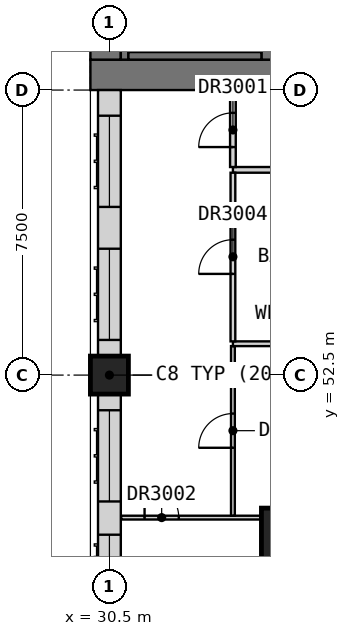
"""IFC4 building model, lengths in metres.
Left out: names, types, materials, properties, quantities, classifications, styles, units other than length and angle.
Written with IfcOpenShell. Run it as: python <this file> out.ifc"""

import sys

from ifc_helpers import new_model, si_unit, direction, frame, frame_2d, origin, origin_2d, place, context, subcontext, project, spatial, rectangle, extrude, element, fill, save


model = new_model("IFC4")
c1 = context("Model", 3, precision=1e-05, world=origin(), true_north=direction((0.0, 1.0)))
c2 = subcontext(c1, "Body", "Model", "MODEL_VIEW")
j1 = project(units=[si_unit("LENGTHUNIT", "METRE"), si_unit("PLANEANGLEUNIT", "RADIAN")], contexts=[c1])
p1 = place(None, origin())
s1 = spatial("IfcSite", under=j1, at=p1, CompositionType="ELEMENT")
p2 = place(p1, origin())
s2 = spatial("IfcBuilding", under=s1, at=p2, CompositionType="ELEMENT")
p3 = place(p2, frame((0.0, 0.0, 186.2)))
s3 = spatial("IfcBuildingStorey", under=s2, at=p3, CompositionType="ELEMENT", Elevation=186.2)
p4 = place(p3, frame((30.5, 52.5, 0.0), z_axis=(0.0, 0.0, 1.0), x_axis=(1.0, 0.0, 0.0)))
e1 = element("IfcColumn", 1, at=p4, inside=s3, PredefinedType="COLUMN", context=c2, shape_type="SweptSolid", body=[
    extrude(rectangle(XDim=1.0, YDim=1.0, at=origin_2d()), origin(), (0.0, 0.0, 1.0), 3.5),
])
p5 = place(p3, frame((36.125, 47.375, 0.0), z_axis=(0.0, 0.0, 1.0), x_axis=(1.0, 0.0, 0.0)))
e2 = element("IfcColumn", 2, at=p5, inside=s3, PredefinedType="COLUMN", context=c2, shape_type="SweptSolid", body=[
    extrude(rectangle(XDim=3.25, YDim=3.25, at=origin_2d()), origin(), (0.0, 0.0, 1.0), 3.5),
])
p6 = place(p3, frame((30.0, 60.4, 0.0), z_axis=(0.0, 0.0, 1.0), x_axis=(1.0, 0.0, 0.0)))
e3 = element("IfcWall", 3, at=p6, inside=s3, PredefinedType="SHEAR", context=c2, shape_type="SweptSolid", body=[
    extrude(rectangle(XDim=30.0, YDim=0.8, at=frame_2d((15.0, 0.0))), origin(), (0.0, 0.0, 1.0), 3.5),
])
p7 = place(p6, frame((21.9, 0.0, 0.0)))
e4 = element("IfcOpeningElement", 4, at=p7, cuts=e3, PredefinedType="OPENING", context=c2, shape_type="SweptSolid", body=[
    extrude(rectangle(XDim=1.8, YDim=2.1, at=frame_2d((0.9, 1.05))), frame((0.0, 0.41, 0.0), z_axis=(0.0, -1.0, 0.0), x_axis=(1.0, 0.0, 0.0)), (0.0, 0.0, 1.0), 0.82),
])
p8 = place(p6, frame((26.5, 0.0, 0.0)))
e5 = element("IfcOpeningElement", 5, at=p8, cuts=e3, PredefinedType="OPENING", context=c2, shape_type="SweptSolid", body=[
    extrude(rectangle(XDim=1.2, YDim=2.1, at=frame_2d((0.6, 1.05))), frame((0.0, 0.41, 0.0), z_axis=(0.0, -1.0, 0.0), x_axis=(1.0, 0.0, 0.0)), (0.0, 0.0, 1.0), 0.82),
])
p9 = place(p3, frame((30.4, 60.8, 0.0), z_axis=(0.0, 0.0, 1.0), x_axis=(0.0, 1.0, 0.0)))
e6 = element("IfcWall", 6, at=p9, inside=s3, PredefinedType="SHEAR", context=c2, shape_type="SweptSolid", body=[
    extrude(rectangle(XDim=20.9, YDim=0.8, at=frame_2d((10.45, 0.0))), origin(), (0.0, 0.0, 1.0), 3.5),
])
p10 = place(p3, frame((34.75, 60.8, 0.0), z_axis=(0.0, 0.0, 1.0), x_axis=(0.0, 1.0, 0.0)))
e7 = element("IfcWall", 7, at=p10, inside=s3, PredefinedType="SHEAR", context=c2, shape_type="SweptSolid", body=[
    extrude(rectangle(XDim=3.4, YDim=0.5, at=frame_2d((1.7, 0.0))), origin(), (0.0, 0.0, 1.0), 3.5),
])
p11 = place(p3, frame((30.5, 60.0, 0.0), z_axis=(0.0, 0.0, 1.0), x_axis=(0.0, -1.0, 0.0)))
e8 = element("IfcWall", 8, at=p11, inside=s3, PredefinedType="SOLIDWALL", context=c2, shape_type="SweptSolid", body=[
    extrude(rectangle(XDim=7.0, YDim=0.6, at=frame_2d((3.5, 0.0))), origin(), (0.0, 0.0, 1.0), 3.25),
])
p12 = place(p11, frame((4.175, 0.0, 0.8)))
e9 = element("IfcOpeningElement", 9, at=p12, cuts=e8, PredefinedType="OPENING", context=c2, shape_type="SweptSolid", body=[
    extrude(rectangle(XDim=2.4, YDim=1.8, at=frame_2d((1.2, 0.9))), frame((0.0, 0.31, 0.0), z_axis=(0.0, -1.0, 0.0), x_axis=(1.0, 0.0, 0.0)), (0.0, 0.0, 1.0), 0.62),
])
p13 = place(p11, frame((0.675, 0.0, 0.8)))
e10 = element("IfcOpeningElement", 10, at=p13, cuts=e8, PredefinedType="OPENING", context=c2, shape_type="SweptSolid", body=[
    extrude(rectangle(XDim=2.4, YDim=1.8, at=frame_2d((1.2, 0.9))), frame((0.0, 0.31, 0.0), z_axis=(0.0, -1.0, 0.0), x_axis=(1.0, 0.0, 0.0)), (0.0, 0.0, 1.0), 0.62),
])
p14 = place(p3, frame((30.5, 52.0, 0.0), z_axis=(0.0, 0.0, 1.0), x_axis=(0.0, -1.0, 0.0)))
e11 = element("IfcWall", 11, at=p14, inside=s3, PredefinedType="SOLIDWALL", context=c2, shape_type="SweptSolid", body=[
    extrude(rectangle(XDim=6.25, YDim=0.6, at=frame_2d((3.125, 0.0))), origin(), (0.0, 0.0, 1.0), 2.75),
])
p15 = place(p14, frame((3.7, 0.0, 0.8)))
e12 = element("IfcOpeningElement", 12, at=p15, cuts=e11, PredefinedType="OPENING", context=c2, shape_type="SweptSolid", body=[
    extrude(rectangle(XDim=1.2, YDim=1.8, at=frame_2d((0.6, 0.9))), frame((0.0, 0.31, 0.0), z_axis=(0.0, -1.0, 0.0), x_axis=(1.0, 0.0, 0.0)), (0.0, 0.0, 1.0), 0.62),
])
p16 = place(p14, frame((0.425, 0.0, 0.8)))
e13 = element("IfcOpeningElement", 13, at=p16, cuts=e11, PredefinedType="OPENING", context=c2, shape_type="SweptSolid", body=[
    extrude(rectangle(XDim=2.4, YDim=1.8, at=frame_2d((1.2, 0.9))), frame((0.0, 0.31, 0.0), z_axis=(0.0, -1.0, 0.0), x_axis=(1.0, 0.0, 0.0)), (0.0, 0.0, 1.0), 0.62),
])
p17 = place(p3, frame((30.9, 60.8, 0.0), z_axis=(0.0, 0.0, 1.0), x_axis=(0.0, 1.0, 0.0)))
e14 = element("IfcWall", 14, at=p17, inside=s3, PredefinedType="SOLIDWALL", context=c2, shape_type="SweptSolid", body=[
    extrude(rectangle(XDim=20.9, YDim=0.2, at=frame_2d((10.45, 0.0))), origin(), (0.0, 0.0, 1.0), 3.25),
])
p18 = place(p3, frame((31.0, 60.9, 0.0), z_axis=(0.0, 0.0, 1.0), x_axis=(1.0, 0.0, 0.0)))
e15 = element("IfcWall", 15, at=p18, inside=s3, PredefinedType="SOLIDWALL", context=c2, shape_type="SweptSolid", body=[
    extrude(rectangle(XDim=3.5, YDim=0.2, at=frame_2d((1.75, 0.0))), origin(), (0.0, 0.0, 1.0), 3.25),
])
p19 = place(p3, frame((33.75, 57.9, 0.0), z_axis=(0.0, 0.0, 1.0), x_axis=(1.0, 0.0, 0.0)))
e16 = element("IfcWall", 16, at=p19, inside=s3, PredefinedType="PARTITIONING", context=c2, shape_type="SweptSolid", body=[
    extrude(rectangle(XDim=28.35, YDim=0.15, at=frame_2d((14.175, 0.0))), origin(), (0.0, 0.0, 1.0), 3.25),
])
p20 = place(p19, frame((5.175, 0.0, 0.0)))
e17 = element("IfcOpeningElement", 17, at=p20, cuts=e16, PredefinedType="OPENING", context=c2, shape_type="SweptSolid", body=[
    extrude(rectangle(XDim=0.9, YDim=2.1, at=frame_2d((0.45, 1.05))), frame((0.0, 0.085, 0.0), z_axis=(0.0, -1.0, 0.0), x_axis=(1.0, 0.0, 0.0)), (0.0, 0.0, 1.0), 0.17),
])
p21 = place(p19, frame((12.675, 0.0, 0.0)))
e18 = element("IfcOpeningElement", 18, at=p21, cuts=e16, PredefinedType="OPENING", context=c2, shape_type="SweptSolid", body=[
    extrude(rectangle(XDim=0.9, YDim=2.1, at=frame_2d((0.45, 1.05))), frame((0.0, 0.085, 0.0), z_axis=(0.0, -1.0, 0.0), x_axis=(1.0, 0.0, 0.0)), (0.0, 0.0, 1.0), 0.17),
])
p22 = place(p19, frame((20.175, 0.0, 0.0)))
e19 = element("IfcOpeningElement", 19, at=p22, cuts=e16, PredefinedType="OPENING", context=c2, shape_type="SweptSolid", body=[
    extrude(rectangle(XDim=0.9, YDim=2.1, at=frame_2d((0.45, 1.05))), frame((0.0, 0.085, 0.0), z_axis=(0.0, -1.0, 0.0), x_axis=(1.0, 0.0, 0.0)), (0.0, 0.0, 1.0), 0.17),
])
p23 = place(p19, frame((26.8, 0.0, 0.0)))
e20 = element("IfcOpeningElement", 20, at=p23, cuts=e16, PredefinedType="OPENING", context=c2, shape_type="SweptSolid", body=[
    extrude(rectangle(XDim=1.0, YDim=2.1, at=frame_2d((0.5, 1.05))), frame((0.0, 0.085, 0.0), z_axis=(0.0, -1.0, 0.0), x_axis=(1.0, 0.0, 0.0)), (0.0, 0.0, 1.0), 0.17),
])
p24 = place(p3, frame((33.75, 57.975, 0.0), z_axis=(0.0, 0.0, 1.0), x_axis=(0.0, 1.0, 0.0)))
e21 = element("IfcWall", 21, at=p24, inside=s3, PredefinedType="PARTITIONING", context=c2, shape_type="SweptSolid", body=[
    extrude(rectangle(XDim=2.025, YDim=0.15, at=frame_2d((1.012, 0.0))), origin(), (0.0, 0.0, 1.0), 3.25),
])
p25 = place(p24, frame((0.525, 0.0, 0.0)))
e22 = element("IfcOpeningElement", 22, at=p25, cuts=e21, PredefinedType="OPENING", context=c2, shape_type="SweptSolid", body=[
    extrude(rectangle(XDim=0.9, YDim=2.1, at=frame_2d((0.45, 1.05))), frame((0.0, 0.085, 0.0), z_axis=(0.0, -1.0, 0.0), x_axis=(1.0, 0.0, 0.0)), (0.0, 0.0, 1.0), 0.17),
])
p26 = place(p3, frame((30.81, 48.75, 0.0), z_axis=(0.0, 0.0, 1.0), x_axis=(1.0, 0.0, 0.0)))
e23 = element("IfcWall", 23, at=p26, inside=s3, PredefinedType="PARTITIONING", context=c2, shape_type="SweptSolid", body=[
    extrude(rectangle(XDim=29.09, YDim=0.1, at=frame_2d((14.545, 0.0))), origin(), (0.0, 0.0, 1.0), 3.25),
])
p27 = place(p26, frame((0.615, 0.0, 0.0)))
e24 = element("IfcOpeningElement", 24, at=p27, cuts=e23, PredefinedType="OPENING", context=c2, shape_type="SweptSolid", body=[
    extrude(rectangle(XDim=0.9, YDim=2.1, at=frame_2d((0.45, 1.05))), frame((0.0, 0.06, 0.0), z_axis=(0.0, -1.0, 0.0), x_axis=(1.0, 0.0, 0.0)), (0.0, 0.0, 1.0), 0.12),
])
p28 = place(p26, frame((8.115, 0.0, 0.0)))
e25 = element("IfcOpeningElement", 25, at=p28, cuts=e23, PredefinedType="OPENING", context=c2, shape_type="SweptSolid", body=[
    extrude(rectangle(XDim=0.9, YDim=2.1, at=frame_2d((0.45, 1.05))), frame((0.0, 0.06, 0.0), z_axis=(0.0, -1.0, 0.0), x_axis=(1.0, 0.0, 0.0)), (0.0, 0.0, 1.0), 0.12),
])
p29 = place(p26, frame((15.615, 0.0, 0.0)))
e26 = element("IfcOpeningElement", 26, at=p29, cuts=e23, PredefinedType="OPENING", context=c2, shape_type="SweptSolid", body=[
    extrude(rectangle(XDim=0.9, YDim=2.1, at=frame_2d((0.45, 1.05))), frame((0.0, 0.06, 0.0), z_axis=(0.0, -1.0, 0.0), x_axis=(1.0, 0.0, 0.0)), (0.0, 0.0, 1.0), 0.12),
])
p30 = place(p26, frame((23.115, 0.0, 0.0)))
e27 = element("IfcOpeningElement", 27, at=p30, cuts=e23, PredefinedType="OPENING", context=c2, shape_type="SweptSolid", body=[
    extrude(rectangle(XDim=0.9, YDim=2.1, at=frame_2d((0.45, 1.05))), frame((0.0, 0.06, 0.0), z_axis=(0.0, -1.0, 0.0), x_axis=(1.0, 0.0, 0.0)), (0.0, 0.0, 1.0), 0.12),
])
p31 = place(p3, frame((33.75, 48.8, 0.0), z_axis=(0.0, 0.0, 1.0), x_axis=(0.0, 1.0, 0.0)))
e28 = element("IfcWall", 28, at=p31, inside=s3, PredefinedType="PARTITIONING", context=c2, shape_type="SweptSolid", body=[
    extrude(rectangle(XDim=4.462, YDim=0.1, at=frame_2d((2.231, 0.0))), origin(), (0.0, 0.0, 1.0), 3.25),
])
p32 = place(p31, frame((1.788, 0.0, 0.0)))
e29 = element("IfcOpeningElement", 29, at=p32, cuts=e28, PredefinedType="OPENING", context=c2, shape_type="SweptSolid", body=[
    extrude(rectangle(XDim=0.9, YDim=2.1, at=frame_2d((0.45, 1.05))), frame((0.0, 0.06, 0.0), z_axis=(0.0, -1.0, 0.0), x_axis=(1.0, 0.0, 0.0)), (0.0, 0.0, 1.0), 0.12),
])
p33 = place(p3, frame((33.75, 53.325, 0.0), z_axis=(0.0, 0.0, 1.0), x_axis=(1.0, 0.0, 0.0)))
e30 = element("IfcWall", 30, at=p33, inside=s3, PredefinedType="PARTITIONING", context=c2, shape_type="SweptSolid", body=[
    extrude(rectangle(XDim=3.65, YDim=0.125, at=frame_2d((1.825, 0.0))), origin(), (0.0, 0.0, 1.0), 3.25),
])
p34 = place(p3, frame((33.75, 53.387, 0.0), z_axis=(0.0, 0.0, 1.0), x_axis=(0.0, 1.0, 0.0)))
e31 = element("IfcWall", 31, at=p34, inside=s3, PredefinedType="PARTITIONING", context=c2, shape_type="SweptSolid", body=[
    extrude(rectangle(XDim=4.438, YDim=0.125, at=frame_2d((2.219, 0.0))), origin(), (0.0, 0.0, 1.0), 3.25),
])
p35 = place(p34, frame((1.775, 0.0, 0.0)))
e32 = element("IfcOpeningElement", 32, at=p35, cuts=e31, PredefinedType="OPENING", context=c2, shape_type="SweptSolid", body=[
    extrude(rectangle(XDim=0.9, YDim=2.1, at=frame_2d((0.45, 1.05))), frame((0.0, 0.073, 0.0), z_axis=(0.0, -1.0, 0.0), x_axis=(1.0, 0.0, 0.0)), (0.0, 0.0, 1.0), 0.145),
])
p36 = place(p12, origin())
e33 = element("IfcWindow", 33, at=p36, inside=s3, PartitioningType="SINGLE_PANEL", PredefinedType="WINDOW", context=c2, shape_type="SweptSolid", body=[
    extrude(rectangle(XDim=2.4, YDim=1.8, at=frame_2d((1.2, 0.9))), frame((0.0, -0.07, 0.0), z_axis=(0.0, -1.0, 0.0), x_axis=(1.0, 0.0, 0.0)), (0.0, 0.0, 1.0), 0.06),
])
fill(e9, e33)
p37 = place(p13, origin())
e34 = element("IfcWindow", 34, at=p37, inside=s3, PartitioningType="SINGLE_PANEL", PredefinedType="WINDOW", context=c2, shape_type="SweptSolid", body=[
    extrude(rectangle(XDim=2.4, YDim=1.8, at=frame_2d((1.2, 0.9))), frame((0.0, -0.07, 0.0), z_axis=(0.0, -1.0, 0.0), x_axis=(1.0, 0.0, 0.0)), (0.0, 0.0, 1.0), 0.06),
])
fill(e10, e34)
p38 = place(p15, origin())
e35 = element("IfcWindow", 35, at=p38, inside=s3, PartitioningType="SINGLE_PANEL", PredefinedType="WINDOW", context=c2, shape_type="SweptSolid", body=[
    extrude(rectangle(XDim=1.2, YDim=1.8, at=frame_2d((0.6, 0.9))), frame((0.0, -0.07, 0.0), z_axis=(0.0, -1.0, 0.0), x_axis=(1.0, 0.0, 0.0)), (0.0, 0.0, 1.0), 0.06),
])
fill(e12, e35)
p39 = place(p16, origin())
e36 = element("IfcWindow", 36, at=p39, inside=s3, PartitioningType="SINGLE_PANEL", PredefinedType="WINDOW", context=c2, shape_type="SweptSolid", body=[
    extrude(rectangle(XDim=2.4, YDim=1.8, at=frame_2d((1.2, 0.9))), frame((0.0, -0.07, 0.0), z_axis=(0.0, -1.0, 0.0), x_axis=(1.0, 0.0, 0.0)), (0.0, 0.0, 1.0), 0.06),
])
fill(e13, e36)
p40 = place(p25, origin())
e37 = element("IfcDoor", 37, at=p40, inside=s3, OperationType="SINGLE_SWING_LEFT", PredefinedType="DOOR", context=c2, shape_type="SweptSolid", body=[
    extrude(rectangle(XDim=0.9, YDim=2.1, at=frame_2d((0.45, 1.05))), frame((0.0, 0.025, 0.0), z_axis=(0.0, -1.0, 0.0), x_axis=(1.0, 0.0, 0.0)), (0.0, 0.0, 1.0), 0.05),
])
fill(e22, e37)
p41 = place(p27, origin())
e38 = element("IfcDoor", 38, at=p41, inside=s3, OperationType="SINGLE_SWING_LEFT", PredefinedType="DOOR", context=c2, shape_type="SweptSolid", body=[
    extrude(rectangle(XDim=0.9, YDim=2.1, at=frame_2d((0.45, 1.05))), frame((0.0, 0.025, 0.0), z_axis=(0.0, -1.0, 0.0), x_axis=(1.0, 0.0, 0.0)), (0.0, 0.0, 1.0), 0.05),
])
fill(e24, e38)
p42 = place(p32, origin())
e39 = element("IfcDoor", 39, at=p42, inside=s3, OperationType="SINGLE_SWING_RIGHT", PredefinedType="DOOR", context=c2, shape_type="SweptSolid", body=[
    extrude(rectangle(XDim=0.9, YDim=2.1, at=frame_2d((0.45, 1.05))), frame((0.0, 0.025, 0.0), z_axis=(0.0, -1.0, 0.0), x_axis=(1.0, 0.0, 0.0)), (0.0, 0.0, 1.0), 0.05),
])
fill(e29, e39)
p43 = place(p35, origin())
e40 = element("IfcDoor", 40, at=p43, inside=s3, OperationType="SINGLE_SWING_RIGHT", PredefinedType="DOOR", context=c2, shape_type="SweptSolid", body=[
    extrude(rectangle(XDim=0.9, YDim=2.1, at=frame_2d((0.45, 1.05))), frame((0.0, 0.025, 0.0), z_axis=(0.0, -1.0, 0.0), x_axis=(1.0, 0.0, 0.0)), (0.0, 0.0, 1.0), 0.05),
])
fill(e32, e40)
save(model, sys.argv[1])
